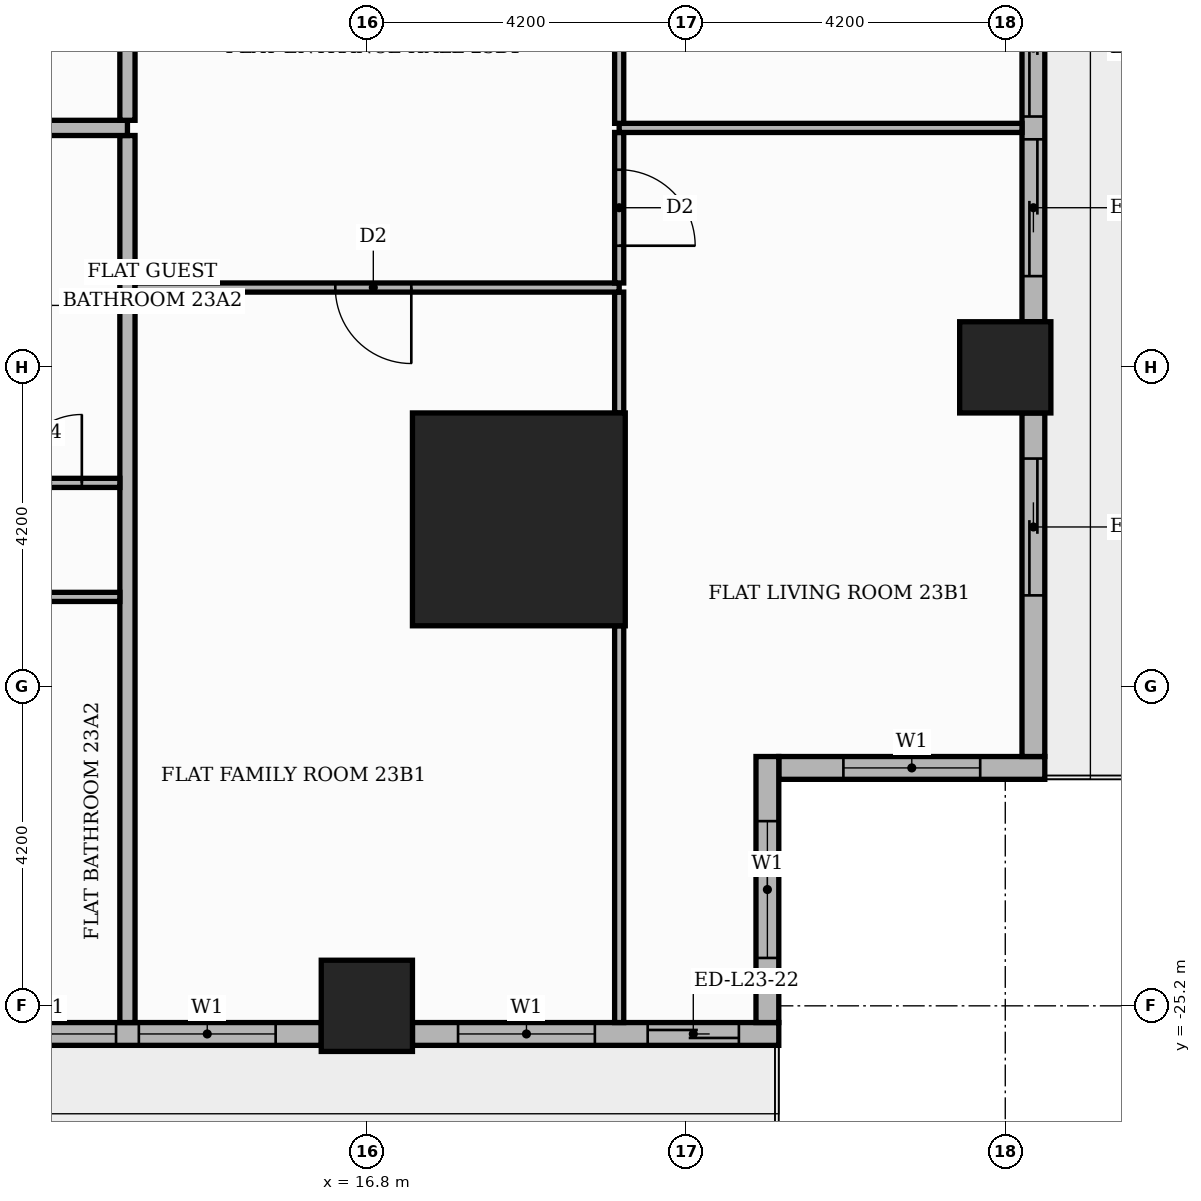
"""IFC4 building model, lengths in metres.
Left out: names, types, materials, properties, quantities, classifications, styles, units other than length and angle.
Written with IfcOpenShell. Run it as: python <this file> out.ifc"""

import sys

from ifc_helpers import new_model, si_unit, direction, frame, frame_2d, origin, origin_2d, place, context, subcontext, project, spatial, rectangle, extrude, element, fill, save


model = new_model("IFC4")
c1 = context("Model", 3, precision=1e-05, world=origin(), true_north=direction((0.0, 1.0)))
c2 = subcontext(c1, "Body", "Model", "MODEL_VIEW")
j1 = project(units=[si_unit("LENGTHUNIT", "METRE"), si_unit("PLANEANGLEUNIT", "RADIAN")], contexts=[c1])
p1 = place(None, origin())
s1 = spatial("IfcSite", under=j1, at=p1, CompositionType="ELEMENT")
p2 = place(p1, origin())
s2 = spatial("IfcBuilding", under=s1, at=p2, CompositionType="ELEMENT")
p3 = place(p2, frame((0.0, 0.0, 98.7)))
s3 = spatial("IfcBuildingStorey", under=s2, at=p3, CompositionType="ELEMENT", Elevation=98.7)
p4 = place(p3, frame((18.8, -18.8, 0.0), z_axis=(0.0, 0.0, 1.0), x_axis=(1.0, 0.0, 0.0)))
e1 = element("IfcColumn", 1, at=p4, inside=s3, PredefinedType="COLUMN", context=c2, shape_type="SweptSolid", body=[
    extrude(rectangle(XDim=2.8, YDim=2.8, at=origin_2d()), origin(), (0.0, 0.0, 1.0), 3.9),
])
for number, where, z_axis, x_axis in (
    (2, (25.2, -16.8, 0.0), (0.0, 0.0, 1.0), (1.0, 0.0, 0.0)),
    (3, (16.8, -25.2, 0.0), (0.0, 0.0, 1.0), (1.0, 0.0, 0.0)),
):
    element("IfcColumn", number, at=place(p3, frame(where, z_axis=z_axis, x_axis=x_axis)), inside=s3, PredefinedType="COLUMN", context=c2, shape_type="SweptSolid", body=[
        extrude(rectangle(XDim=1.2, YDim=1.2, at=origin_2d()), origin(), (0.0, 0.0, 1.0), 3.9),
    ])
p5 = place(p3, frame((22.22, -22.07, 0.0), z_axis=(0.0, 0.0, 1.0), x_axis=(1.0, 0.0, 0.0)))
e4 = element("IfcWall", 4, at=p5, inside=s3, PredefinedType="STANDARD", context=c2, shape_type="SweptSolid", body=[
    extrude(rectangle(XDim=3.5, YDim=0.3, at=frame_2d((1.75, 0.0))), origin(), (0.0, 0.0, 1.0), 3.48),
])
p6 = place(p5, frame((0.85, 0.0, 0.9)))
e5 = element("IfcOpeningElement", 5, at=p6, cuts=e4, PredefinedType="OPENING", context=c2, shape_type="SweptSolid", body=[
    extrude(rectangle(XDim=1.8, YDim=2.1, at=frame_2d((0.9, 1.05))), frame((0.0, 0.16, 0.0), z_axis=(0.0, -1.0, 0.0), x_axis=(1.0, 0.0, 0.0)), (0.0, 0.0, 1.0), 0.32),
])
p7 = place(p3, frame((25.57, -21.92, 0.0), z_axis=(0.0, 0.0, 1.0), x_axis=(0.0, 1.0, 0.0)))
e6 = element("IfcWall", 6, at=p7, inside=s3, PredefinedType="STANDARD", context=c2, shape_type="SweptSolid", body=[
    extrude(rectangle(XDim=4.52, YDim=0.3, at=frame_2d((2.26, 0.0))), origin(), (0.0, 0.0, 1.0), 3.48),
])
p8 = place(p7, frame((2.12, 0.0, 0.0)))
e7 = element("IfcOpeningElement", 7, at=p8, cuts=e6, PredefinedType="OPENING", context=c2, shape_type="SweptSolid", body=[
    extrude(rectangle(XDim=1.8, YDim=2.4, at=frame_2d((0.9, 1.2))), frame((0.0, 0.16, 0.0), z_axis=(0.0, -1.0, 0.0), x_axis=(1.0, 0.0, 0.0)), (0.0, 0.0, 1.0), 0.32),
])
p9 = place(p3, frame((25.57, -16.2, 0.0), z_axis=(0.0, 0.0, 1.0), x_axis=(0.0, 1.0, 0.0)))
e8 = element("IfcWall", 8, at=p9, inside=s3, PredefinedType="STANDARD", context=c2, shape_type="SweptSolid", body=[
    extrude(rectangle(XDim=7.2, YDim=0.3, at=frame_2d((3.6, 0.0))), origin(), (0.0, 0.0, 1.0), 3.48),
])
p10 = place(p9, frame((0.6, 0.0, 0.0)))
e9 = element("IfcOpeningElement", 9, at=p10, cuts=e8, PredefinedType="OPENING", context=c2, shape_type="SweptSolid", body=[
    extrude(rectangle(XDim=1.8, YDim=2.4, at=frame_2d((0.9, 1.2))), frame((0.0, 0.16, 0.0), z_axis=(0.0, -1.0, 0.0), x_axis=(1.0, 0.0, 0.0)), (0.0, 0.0, 1.0), 0.32),
])
p11 = place(p9, frame((2.7, 0.0, 0.0)))
e10 = element("IfcOpeningElement", 10, at=p11, cuts=e8, PredefinedType="OPENING", context=c2, shape_type="SweptSolid", body=[
    extrude(rectangle(XDim=1.8, YDim=2.4, at=frame_2d((0.9, 1.2))), frame((0.0, 0.16, 0.0), z_axis=(0.0, -1.0, 0.0), x_axis=(1.0, 0.0, 0.0)), (0.0, 0.0, 1.0), 0.32),
])
p12 = place(p9, frame((4.8, 0.0, 0.9)))
e11 = element("IfcOpeningElement", 11, at=p12, cuts=e8, PredefinedType="OPENING", context=c2, shape_type="SweptSolid", body=[
    extrude(rectangle(XDim=1.8, YDim=2.1, at=frame_2d((0.9, 1.05))), frame((0.0, 0.16, 0.0), z_axis=(0.0, -1.0, 0.0), x_axis=(1.0, 0.0, 0.0)), (0.0, 0.0, 1.0), 0.32),
])
p13 = place(p3, frame((9.0, -25.57, 0.0), z_axis=(0.0, 0.0, 1.0), x_axis=(1.0, 0.0, 0.0)))
e12 = element("IfcWall", 12, at=p13, inside=s3, PredefinedType="STANDARD", context=c2, shape_type="SweptSolid", body=[
    extrude(rectangle(XDim=7.2, YDim=0.3, at=frame_2d((3.6, 0.0))), origin(), (0.0, 0.0, 1.0), 3.48),
])
p14 = place(p13, frame((0.6, 0.0, 0.9)))
e13 = element("IfcOpeningElement", 13, at=p14, cuts=e12, PredefinedType="OPENING", context=c2, shape_type="SweptSolid", body=[
    extrude(rectangle(XDim=1.8, YDim=2.1, at=frame_2d((0.9, 1.05))), frame((0.0, 0.16, 0.0), z_axis=(0.0, -1.0, 0.0), x_axis=(1.0, 0.0, 0.0)), (0.0, 0.0, 1.0), 0.32),
])
p15 = place(p13, frame((2.7, 0.0, 0.9)))
e14 = element("IfcOpeningElement", 14, at=p15, cuts=e12, PredefinedType="OPENING", context=c2, shape_type="SweptSolid", body=[
    extrude(rectangle(XDim=1.8, YDim=2.1, at=frame_2d((0.9, 1.05))), frame((0.0, 0.16, 0.0), z_axis=(0.0, -1.0, 0.0), x_axis=(1.0, 0.0, 0.0)), (0.0, 0.0, 1.0), 0.32),
])
p16 = place(p13, frame((4.8, 0.0, 0.9)))
e15 = element("IfcOpeningElement", 15, at=p16, cuts=e12, PredefinedType="OPENING", context=c2, shape_type="SweptSolid", body=[
    extrude(rectangle(XDim=1.8, YDim=2.1, at=frame_2d((0.9, 1.05))), frame((0.0, 0.16, 0.0), z_axis=(0.0, -1.0, 0.0), x_axis=(1.0, 0.0, 0.0)), (0.0, 0.0, 1.0), 0.32),
])
p17 = place(p3, frame((17.4, -25.57, 0.0), z_axis=(0.0, 0.0, 1.0), x_axis=(1.0, 0.0, 0.0)))
e16 = element("IfcWall", 16, at=p17, inside=s3, PredefinedType="STANDARD", context=c2, shape_type="SweptSolid", body=[
    extrude(rectangle(XDim=4.82, YDim=0.3, at=frame_2d((2.41, 0.0))), origin(), (0.0, 0.0, 1.0), 3.48),
])
p18 = place(p17, frame((0.6, 0.0, 0.9)))
e17 = element("IfcOpeningElement", 17, at=p18, cuts=e16, PredefinedType="OPENING", context=c2, shape_type="SweptSolid", body=[
    extrude(rectangle(XDim=1.8, YDim=2.1, at=frame_2d((0.9, 1.05))), frame((0.0, 0.16, 0.0), z_axis=(0.0, -1.0, 0.0), x_axis=(1.0, 0.0, 0.0)), (0.0, 0.0, 1.0), 0.32),
])
p19 = place(p17, frame((3.095, 0.0, 0.0)))
e18 = element("IfcOpeningElement", 18, at=p19, cuts=e16, PredefinedType="OPENING", context=c2, shape_type="SweptSolid", body=[
    extrude(rectangle(XDim=1.2, YDim=2.4, at=frame_2d((0.6, 1.2))), frame((0.0, 0.16, 0.0), z_axis=(0.0, -1.0, 0.0), x_axis=(1.0, 0.0, 0.0)), (0.0, 0.0, 1.0), 0.32),
])
p20 = place(p3, frame((22.07, -25.42, 0.0), z_axis=(0.0, 0.0, 1.0), x_axis=(0.0, 1.0, 0.0)))
e19 = element("IfcWall", 19, at=p20, inside=s3, PredefinedType="STANDARD", context=c2, shape_type="SweptSolid", body=[
    extrude(rectangle(XDim=3.5, YDim=0.3, at=frame_2d((1.75, 0.0))), origin(), (0.0, 0.0, 1.0), 3.48),
])
p21 = place(p20, frame((0.85, 0.0, 0.9)))
e20 = element("IfcOpeningElement", 20, at=p21, cuts=e19, PredefinedType="OPENING", context=c2, shape_type="SweptSolid", body=[
    extrude(rectangle(XDim=1.8, YDim=2.1, at=frame_2d((0.9, 1.05))), frame((0.0, 0.16, 0.0), z_axis=(0.0, -1.0, 0.0), x_axis=(1.0, 0.0, 0.0)), (0.0, 0.0, 1.0), 0.32),
])
p22 = place(p3, frame((13.65, -25.42, 0.0), z_axis=(0.0, 0.0, 1.0), x_axis=(0.0, 1.0, 0.0)))
e21 = element("IfcWall", 21, at=p22, inside=s3, PredefinedType="PARTITIONING", context=c2, shape_type="SweptSolid", body=[
    extrude(rectangle(XDim=11.67, YDim=0.2, at=frame_2d((5.835, 0.0))), origin(), (0.0, 0.0, 1.0), 3.48),
])
p23 = place(p3, frame((20.12, -25.42, 0.0), z_axis=(0.0, 0.0, 1.0), x_axis=(0.0, 1.0, 0.0)))
e22 = element("IfcWall", 22, at=p23, inside=s3, PredefinedType="PARTITIONING", context=c2, shape_type="SweptSolid", body=[
    extrude(rectangle(XDim=5.22, YDim=0.12, at=frame_2d((2.61, 0.0))), origin(), (0.0, 0.0, 1.0), 3.48),
])
p24 = place(p3, frame((-5.15, -19.82, 0.0), z_axis=(0.0, 0.0, 1.0), x_axis=(1.0, 0.0, 0.0)))
e23 = element("IfcWall", 23, at=p24, inside=s3, PredefinedType="PARTITIONING", context=c2, shape_type="SweptSolid", body=[
    extrude(rectangle(XDim=18.7, YDim=0.12, at=frame_2d((9.35, 0.0))), origin(), (0.0, 0.0, 1.0), 3.48),
])
p25 = place(p24, frame((1.5, 0.0, 0.0)))
e24 = element("IfcOpeningElement", 24, at=p25, cuts=e23, PredefinedType="OPENING", context=c2, shape_type="SweptSolid", body=[
    extrude(rectangle(XDim=1.0, YDim=2.1, at=frame_2d((0.5, 1.05))), frame((0.0, 0.07, 0.0), z_axis=(0.0, -1.0, 0.0), x_axis=(1.0, 0.0, 0.0)), (0.0, 0.0, 1.0), 0.14),
])
p26 = place(p24, frame((5.75, 0.0, 0.0)))
e25 = element("IfcOpeningElement", 25, at=p26, cuts=e23, PredefinedType="OPENING", context=c2, shape_type="SweptSolid", body=[
    extrude(rectangle(XDim=0.9, YDim=2.1, at=frame_2d((0.45, 1.05))), frame((0.0, 0.07, 0.0), z_axis=(0.0, -1.0, 0.0), x_axis=(1.0, 0.0, 0.0)), (0.0, 0.0, 1.0), 0.14),
])
p27 = place(p24, frame((14.15, 0.0, 0.0)))
e26 = element("IfcOpeningElement", 26, at=p27, cuts=e23, PredefinedType="OPENING", context=c2, shape_type="SweptSolid", body=[
    extrude(rectangle(XDim=0.9, YDim=2.1, at=frame_2d((0.45, 1.05))), frame((0.0, 0.07, 0.0), z_axis=(0.0, -1.0, 0.0), x_axis=(1.0, 0.0, 0.0)), (0.0, 0.0, 1.0), 0.14),
])
p28 = place(p3, frame((1.05, -18.32, 0.0), z_axis=(0.0, 0.0, 1.0), x_axis=(1.0, 0.0, 0.0)))
e27 = element("IfcWall", 27, at=p28, inside=s3, PredefinedType="PARTITIONING", context=c2, shape_type="SweptSolid", body=[
    extrude(rectangle(XDim=12.5, YDim=0.12, at=frame_2d((6.25, 0.0))), origin(), (0.0, 0.0, 1.0), 3.48),
])
p29 = place(p28, frame((2.775, 0.0, 0.0)))
e28 = element("IfcOpeningElement", 28, at=p29, cuts=e27, PredefinedType="OPENING", context=c2, shape_type="SweptSolid", body=[
    extrude(rectangle(XDim=0.9, YDim=2.1, at=frame_2d((0.45, 1.05))), frame((0.0, 0.07, 0.0), z_axis=(0.0, -1.0, 0.0), x_axis=(1.0, 0.0, 0.0)), (0.0, 0.0, 1.0), 0.14),
])
p30 = place(p28, frame((6.975, 0.0, 0.0)))
e29 = element("IfcOpeningElement", 29, at=p30, cuts=e27, PredefinedType="OPENING", context=c2, shape_type="SweptSolid", body=[
    extrude(rectangle(XDim=0.9, YDim=2.1, at=frame_2d((0.45, 1.05))), frame((0.0, 0.07, 0.0), z_axis=(0.0, -1.0, 0.0), x_axis=(1.0, 0.0, 0.0)), (0.0, 0.0, 1.0), 0.14),
])
p31 = place(p28, frame((9.0, 0.0, 0.0)))
e30 = element("IfcOpeningElement", 30, at=p31, cuts=e27, PredefinedType="OPENING", context=c2, shape_type="SweptSolid", body=[
    extrude(rectangle(XDim=0.9, YDim=2.1, at=frame_2d((0.45, 1.05))), frame((0.0, 0.07, 0.0), z_axis=(0.0, -1.0, 0.0), x_axis=(1.0, 0.0, 0.0)), (0.0, 0.0, 1.0), 0.14),
])
p32 = place(p28, frame((11.1, 0.0, 0.0)))
e31 = element("IfcOpeningElement", 31, at=p32, cuts=e27, PredefinedType="OPENING", context=c2, shape_type="SweptSolid", body=[
    extrude(rectangle(XDim=0.9, YDim=2.1, at=frame_2d((0.45, 1.05))), frame((0.0, 0.07, 0.0), z_axis=(0.0, -1.0, 0.0), x_axis=(1.0, 0.0, 0.0)), (0.0, 0.0, 1.0), 0.14),
])
p33 = place(p3, frame((20.12, -17.4, 0.0), z_axis=(0.0, 0.0, 1.0), x_axis=(0.0, 1.0, 0.0)))
e32 = element("IfcWall", 32, at=p33, inside=s3, PredefinedType="PARTITIONING", context=c2, shape_type="SweptSolid", body=[
    extrude(rectangle(XDim=1.59, YDim=0.12, at=frame_2d((0.795, 0.0))), origin(), (0.0, 0.0, 1.0), 3.48),
])
p34 = place(p3, frame((13.75, -15.75, 0.0), z_axis=(0.0, 0.0, 1.0), x_axis=(1.0, 0.0, 0.0)))
e33 = element("IfcWall", 33, at=p34, inside=s3, PredefinedType="PARTITIONING", context=c2, shape_type="SweptSolid", body=[
    extrude(rectangle(XDim=6.37, YDim=0.12, at=frame_2d((3.185, 0.0))), origin(), (0.0, 0.0, 1.0), 3.48),
])
p35 = place(p34, frame((2.635, 0.0, 0.0)))
e34 = element("IfcOpeningElement", 34, at=p35, cuts=e33, PredefinedType="OPENING", context=c2, shape_type="SweptSolid", body=[
    extrude(rectangle(XDim=1.0, YDim=2.1, at=frame_2d((0.5, 1.05))), frame((0.0, 0.07, 0.0), z_axis=(0.0, -1.0, 0.0), x_axis=(1.0, 0.0, 0.0)), (0.0, 0.0, 1.0), 0.14),
])
p36 = place(p3, frame((20.12, -15.69, 0.0), z_axis=(0.0, 0.0, 1.0), x_axis=(0.0, 1.0, 0.0)))
e35 = element("IfcWall", 35, at=p36, inside=s3, PredefinedType="PARTITIONING", context=c2, shape_type="SweptSolid", body=[
    extrude(rectangle(XDim=1.98, YDim=0.12, at=frame_2d((0.99, 0.0))), origin(), (0.0, 0.0, 1.0), 3.48),
])
p37 = place(p36, frame((0.49, 0.0, 0.0)))
e36 = element("IfcOpeningElement", 36, at=p37, cuts=e35, PredefinedType="OPENING", context=c2, shape_type="SweptSolid", body=[
    extrude(rectangle(XDim=1.0, YDim=2.1, at=frame_2d((0.5, 1.05))), frame((0.0, 0.07, 0.0), z_axis=(0.0, -1.0, 0.0), x_axis=(1.0, 0.0, 0.0)), (0.0, 0.0, 1.0), 0.14),
])
p38 = place(p3, frame((-25.42, -13.65, 0.0), z_axis=(0.0, 0.0, 1.0), x_axis=(1.0, 0.0, 0.0)))
e37 = element("IfcWall", 37, at=p38, inside=s3, PredefinedType="PARTITIONING", context=c2, shape_type="SweptSolid", body=[
    extrude(rectangle(XDim=39.07, YDim=0.2, at=frame_2d((19.535, 0.0))), origin(), (0.0, 0.0, 1.0), 3.48),
])
p39 = place(p38, frame((13.32, 0.0, 0.0)))
e38 = element("IfcOpeningElement", 38, at=p39, cuts=e37, PredefinedType="OPENING", context=c2, shape_type="SweptSolid", body=[
    extrude(rectangle(XDim=1.1, YDim=2.4, at=frame_2d((0.55, 1.2))), frame((0.0, 0.11, 0.0), z_axis=(0.0, -1.0, 0.0), x_axis=(1.0, 0.0, 0.0)), (0.0, 0.0, 1.0), 0.22),
])
p40 = place(p38, frame((23.82, 0.0, 0.0)))
e39 = element("IfcOpeningElement", 39, at=p40, cuts=e37, PredefinedType="OPENING", context=c2, shape_type="SweptSolid", body=[
    extrude(rectangle(XDim=1.1, YDim=2.4, at=frame_2d((0.55, 1.2))), frame((0.0, 0.11, 0.0), z_axis=(0.0, -1.0, 0.0), x_axis=(1.0, 0.0, 0.0)), (0.0, 0.0, 1.0), 0.22),
])
p41 = place(p3, frame((20.12, -13.65, 0.0), z_axis=(0.0, 0.0, 1.0), x_axis=(1.0, 0.0, 0.0)))
e40 = element("IfcWall", 40, at=p41, inside=s3, PredefinedType="PARTITIONING", context=c2, shape_type="SweptSolid", body=[
    extrude(rectangle(XDim=5.3, YDim=0.12, at=frame_2d((2.65, 0.0))), origin(), (0.0, 0.0, 1.0), 3.48),
])
p42 = place(p3, frame((20.12, -13.59, 0.0), z_axis=(0.0, 0.0, 1.0), x_axis=(0.0, 1.0, 0.0)))
e41 = element("IfcWall", 41, at=p42, inside=s3, PredefinedType="PARTITIONING", context=c2, shape_type="SweptSolid", body=[
    extrude(rectangle(XDim=4.08, YDim=0.12, at=frame_2d((2.04, 0.0))), origin(), (0.0, 0.0, 1.0), 3.48),
])
p43 = place(p42, frame((1.59, 0.0, 0.0)))
e42 = element("IfcOpeningElement", 42, at=p43, cuts=e41, PredefinedType="OPENING", context=c2, shape_type="SweptSolid", body=[
    extrude(rectangle(XDim=0.9, YDim=2.1, at=frame_2d((0.45, 1.05))), frame((0.0, 0.07, 0.0), z_axis=(0.0, -1.0, 0.0), x_axis=(1.0, 0.0, 0.0)), (0.0, 0.0, 1.0), 0.14),
])
p44 = place(p3, frame((13.65, -13.55, 0.0), z_axis=(0.0, 0.0, 1.0), x_axis=(0.0, 1.0, 0.0)))
e43 = element("IfcWall", 43, at=p44, inside=s3, PredefinedType="PARTITIONING", context=c2, shape_type="SweptSolid", body=[
    extrude(rectangle(XDim=8.2, YDim=0.2, at=frame_2d((4.1, 0.0))), origin(), (0.0, 0.0, 1.0), 3.48),
])
p45 = place(p44, frame((1.45, 0.0, 0.0)))
e44 = element("IfcOpeningElement", 44, at=p45, cuts=e43, PredefinedType="OPENING", context=c2, shape_type="SweptSolid", body=[
    extrude(rectangle(XDim=1.1, YDim=2.4, at=frame_2d((0.55, 1.2))), frame((0.0, 0.11, 0.0), z_axis=(0.0, -1.0, 0.0), x_axis=(1.0, 0.0, 0.0)), (0.0, 0.0, 1.0), 0.22),
])
p46 = place(p6, origin())
e45 = element("IfcWindow", 45, at=p46, inside=s3, PartitioningType="SINGLE_PANEL", PredefinedType="WINDOW", context=c2, shape_type="SweptSolid", body=[
    extrude(rectangle(XDim=1.8, YDim=2.1, at=frame_2d((0.9, 1.05))), frame((0.0, 0.03, 0.0), z_axis=(0.0, -1.0, 0.0), x_axis=(1.0, 0.0, 0.0)), (0.0, 0.0, 1.0), 0.06),
])
fill(e5, e45)
p47 = place(p8, origin())
e46 = element("IfcDoor", 46, at=p47, inside=s3, OperationType="SLIDING_TO_RIGHT", PredefinedType="DOOR", context=c2, shape_type="SweptSolid", body=[
    extrude(rectangle(XDim=1.8, YDim=2.4, at=frame_2d((0.9, 1.2))), frame((0.0, 0.025, 0.0), z_axis=(0.0, -1.0, 0.0), x_axis=(1.0, 0.0, 0.0)), (0.0, 0.0, 1.0), 0.05),
])
fill(e7, e46)
p48 = place(p10, origin())
e47 = element("IfcDoor", 47, at=p48, inside=s3, OperationType="SLIDING_TO_LEFT", PredefinedType="DOOR", context=c2, shape_type="SweptSolid", body=[
    extrude(rectangle(XDim=1.8, YDim=2.4, at=frame_2d((0.9, 1.2))), frame((0.0, 0.025, 0.0), z_axis=(0.0, -1.0, 0.0), x_axis=(1.0, 0.0, 0.0)), (0.0, 0.0, 1.0), 0.05),
])
fill(e9, e47)
p49 = place(p11, origin())
e48 = element("IfcDoor", 48, at=p49, inside=s3, OperationType="SLIDING_TO_RIGHT", PredefinedType="DOOR", context=c2, shape_type="SweptSolid", body=[
    extrude(rectangle(XDim=1.8, YDim=2.4, at=frame_2d((0.9, 1.2))), frame((0.0, 0.025, 0.0), z_axis=(0.0, -1.0, 0.0), x_axis=(1.0, 0.0, 0.0)), (0.0, 0.0, 1.0), 0.05),
])
fill(e10, e48)
p50 = place(p15, origin())
e49 = element("IfcWindow", 49, at=p50, inside=s3, PartitioningType="SINGLE_PANEL", PredefinedType="WINDOW", context=c2, shape_type="SweptSolid", body=[
    extrude(rectangle(XDim=1.8, YDim=2.1, at=frame_2d((0.9, 1.05))), frame((0.0, 0.03, 0.0), z_axis=(0.0, -1.0, 0.0), x_axis=(1.0, 0.0, 0.0)), (0.0, 0.0, 1.0), 0.06),
])
fill(e14, e49)
p51 = place(p16, origin())
e50 = element("IfcWindow", 50, at=p51, inside=s3, PartitioningType="SINGLE_PANEL", PredefinedType="WINDOW", context=c2, shape_type="SweptSolid", body=[
    extrude(rectangle(XDim=1.8, YDim=2.1, at=frame_2d((0.9, 1.05))), frame((0.0, 0.03, 0.0), z_axis=(0.0, -1.0, 0.0), x_axis=(1.0, 0.0, 0.0)), (0.0, 0.0, 1.0), 0.06),
])
fill(e15, e50)
p52 = place(p18, origin())
e51 = element("IfcWindow", 51, at=p52, inside=s3, PartitioningType="SINGLE_PANEL", PredefinedType="WINDOW", context=c2, shape_type="SweptSolid", body=[
    extrude(rectangle(XDim=1.8, YDim=2.1, at=frame_2d((0.9, 1.05))), frame((0.0, 0.03, 0.0), z_axis=(0.0, -1.0, 0.0), x_axis=(1.0, 0.0, 0.0)), (0.0, 0.0, 1.0), 0.06),
])
fill(e17, e51)
p53 = place(p19, origin())
e52 = element("IfcDoor", 52, at=p53, inside=s3, OperationType="SLIDING_TO_RIGHT", PredefinedType="DOOR", context=c2, shape_type="SweptSolid", body=[
    extrude(rectangle(XDim=1.2, YDim=2.4, at=frame_2d((0.6, 1.2))), frame((0.0, 0.025, 0.0), z_axis=(0.0, -1.0, 0.0), x_axis=(1.0, 0.0, 0.0)), (0.0, 0.0, 1.0), 0.05),
])
fill(e18, e52)
p54 = place(p21, origin())
e53 = element("IfcWindow", 53, at=p54, inside=s3, PartitioningType="SINGLE_PANEL", PredefinedType="WINDOW", context=c2, shape_type="SweptSolid", body=[
    extrude(rectangle(XDim=1.8, YDim=2.1, at=frame_2d((0.9, 1.05))), frame((0.0, 0.03, 0.0), z_axis=(0.0, -1.0, 0.0), x_axis=(1.0, 0.0, 0.0)), (0.0, 0.0, 1.0), 0.06),
])
fill(e20, e53)
p55 = place(p32, origin())
e54 = element("IfcDoor", 54, at=p55, inside=s3, OperationType="SINGLE_SWING_RIGHT", PredefinedType="DOOR", context=c2, shape_type="SweptSolid", body=[
    extrude(rectangle(XDim=0.9, YDim=2.1, at=frame_2d((0.45, 1.05))), frame((0.0, 0.025, 0.0), z_axis=(0.0, -1.0, 0.0), x_axis=(1.0, 0.0, 0.0)), (0.0, 0.0, 1.0), 0.05),
])
fill(e31, e54)
p56 = place(p35, frame((1.0, 0.0, 0.0), z_axis=(0.0, 0.0, 1.0), x_axis=(-1.0, 0.0, 0.0)))
e55 = element("IfcDoor", 55, at=p56, inside=s3, OperationType="SINGLE_SWING_RIGHT", PredefinedType="DOOR", context=c2, shape_type="SweptSolid", body=[
    extrude(rectangle(XDim=1.0, YDim=2.1, at=frame_2d((0.5, 1.05))), frame((0.0, 0.025, 0.0), z_axis=(0.0, -1.0, 0.0), x_axis=(1.0, 0.0, 0.0)), (0.0, 0.0, 1.0), 0.05),
])
fill(e34, e55)
p57 = place(p37, frame((1.0, 0.0, 0.0), z_axis=(0.0, 0.0, 1.0), x_axis=(-1.0, 0.0, 0.0)))
e56 = element("IfcDoor", 56, at=p57, inside=s3, OperationType="SINGLE_SWING_LEFT", PredefinedType="DOOR", context=c2, shape_type="SweptSolid", body=[
    extrude(rectangle(XDim=1.0, YDim=2.1, at=frame_2d((0.5, 1.05))), frame((0.0, 0.025, 0.0), z_axis=(0.0, -1.0, 0.0), x_axis=(1.0, 0.0, 0.0)), (0.0, 0.0, 1.0), 0.05),
])
fill(e36, e56)
save(model, sys.argv[1])
